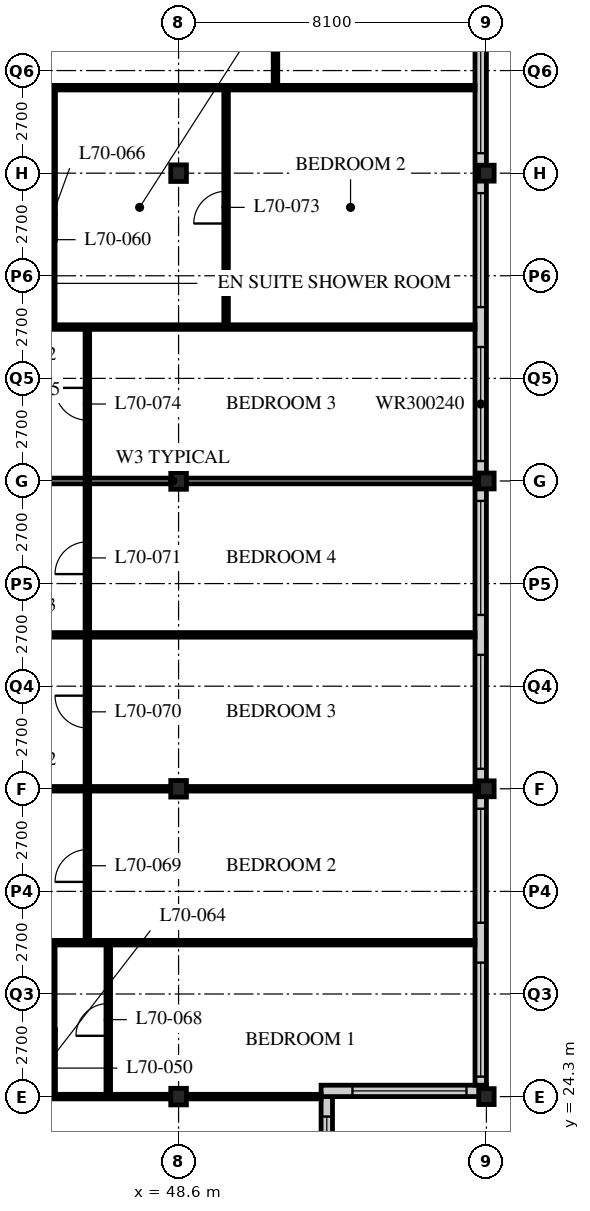
"""IFC4 building model, lengths in metres.
Left out: names, types, materials, properties, quantities, classifications, styles, units other than length and angle.
Written with IfcOpenShell. Run it as: python <this file> out.ifc"""

import sys

from ifc_helpers import new_model, si_unit, direction, frame, frame_2d, origin, origin_2d, place, context, subcontext, project, spatial, rectangle, i_section, extrude, element, fill, save


model = new_model("IFC4")
c1 = context("Model", 3, precision=1e-05, world=origin(), true_north=direction((0.0, 1.0)))
c2 = subcontext(c1, "Body", "Model", "MODEL_VIEW")
j1 = project(units=[si_unit("LENGTHUNIT", "METRE"), si_unit("PLANEANGLEUNIT", "RADIAN")], contexts=[c1])
p1 = place(None, origin())
s1 = spatial("IfcSite", under=j1, at=p1, CompositionType="ELEMENT")
p2 = place(p1, origin())
s2 = spatial("IfcBuilding", under=s1, at=p2, CompositionType="ELEMENT")
p3 = place(p2, frame((0.0, 0.0, 273.6)))
s3 = spatial("IfcBuildingStorey", under=s2, at=p3, CompositionType="ELEMENT", Elevation=273.6)
for number, where, z_axis, x_axis in (
    (1, (48.6, 24.3, 0.0), (0.0, 0.0, 1.0), (1.0, 0.0, 0.0)),
    (2, (48.6, 32.4, 0.0), (0.0, 0.0, 1.0), (1.0, 0.0, 0.0)),
    (3, (48.6, 40.5, 0.0), (0.0, 0.0, 1.0), (1.0, 0.0, 0.0)),
    (4, (48.6, 48.6, 0.0), (0.0, 0.0, 1.0), (1.0, 0.0, 0.0)),
):
    element("IfcColumn", number, at=place(p3, frame(where, z_axis=z_axis, x_axis=x_axis)), inside=s3, PredefinedType="COLUMN", context=c2, shape_type="SweptSolid", body=[
        extrude(i_section(OverallWidth=0.412, OverallDepth=0.437, WebThickness=0.036, FlangeThickness=0.058, FilletRadius=0.015, at=origin_2d()), origin(), (0.0, 0.0, 1.0), 3.9),
    ])
for number, where, z_axis, x_axis in (
    (5, (56.7, 24.3, 0.0), (0.0, 0.0, 1.0), (1.0, 0.0, 0.0)),
    (6, (56.7, 32.4, 0.0), (0.0, 0.0, 1.0), (1.0, 0.0, 0.0)),
    (7, (56.7, 40.5, 0.0), (0.0, 0.0, 1.0), (1.0, 0.0, 0.0)),
    (8, (56.7, 48.6, 0.0), (0.0, 0.0, 1.0), (1.0, 0.0, 0.0)),
):
    element("IfcColumn", number, at=place(p3, frame(where, z_axis=z_axis, x_axis=x_axis)), inside=s3, PredefinedType="COLUMN", context=c2, shape_type="SweptSolid", body=[
        extrude(i_section(OverallWidth=0.407, OverallDepth=0.419, WebThickness=0.031, FlangeThickness=0.049, FilletRadius=0.015, at=origin_2d()), origin(), (0.0, 0.0, 1.0), 3.9),
    ])
p4 = place(p3, frame((52.5, 20.55, 0.0), z_axis=(0.0, 0.0, 1.0), x_axis=(0.0, 1.0, 0.0)))
e9 = element("IfcWall", 9, at=p4, inside=s3, PredefinedType="SOLIDWALL", context=c2, shape_type="SweptSolid", body=[
    extrude(rectangle(XDim=3.75, YDim=0.3, at=frame_2d((1.875, 0.0))), origin(), (0.0, 0.0, 1.0), 3.69),
])
p5 = place(p4, frame((0.225, 0.0, 0.6)))
e10 = element("IfcOpeningElement", 10, at=p5, cuts=e9, PredefinedType="OPENING", context=c2, shape_type="SweptSolid", body=[
    extrude(rectangle(XDim=3.0, YDim=2.3, at=frame_2d((1.5, 1.15))), frame((0.0, 0.16, 0.0), z_axis=(0.0, -1.0, 0.0), x_axis=(1.0, 0.0, 0.0)), (0.0, 0.0, 1.0), 0.32),
])
p6 = place(p3, frame((52.35, 24.45, 0.0), z_axis=(0.0, 0.0, 1.0), x_axis=(1.0, 0.0, 0.0)))
e11 = element("IfcWall", 11, at=p6, inside=s3, PredefinedType="SOLIDWALL", context=c2, shape_type="SweptSolid", body=[
    extrude(rectangle(XDim=4.35, YDim=0.3, at=frame_2d((2.175, 0.0))), origin(), (0.0, 0.0, 1.0), 3.69),
])
p7 = place(p6, frame((0.825, 0.0, 0.6)))
e12 = element("IfcOpeningElement", 12, at=p7, cuts=e11, PredefinedType="OPENING", context=c2, shape_type="SweptSolid", body=[
    extrude(rectangle(XDim=3.0, YDim=2.3, at=frame_2d((1.5, 1.15))), frame((0.0, 0.16, 0.0), z_axis=(0.0, -1.0, 0.0), x_axis=(1.0, 0.0, 0.0)), (0.0, 0.0, 1.0), 0.32),
])
p8 = place(p3, frame((56.55, 24.6, 0.0), z_axis=(0.0, 0.0, 1.0), x_axis=(0.0, 1.0, 0.0)))
e13 = element("IfcWall", 13, at=p8, inside=s3, PredefinedType="SOLIDWALL", context=c2, shape_type="SweptSolid", body=[
    extrude(rectangle(XDim=32.1, YDim=0.3, at=frame_2d((16.05, 0.0))), origin(), (0.0, 0.0, 1.0), 3.69),
])
p9 = place(p8, frame((0.225, 0.0, 0.6)))
e14 = element("IfcOpeningElement", 14, at=p9, cuts=e13, PredefinedType="OPENING", context=c2, shape_type="SweptSolid", body=[
    extrude(rectangle(XDim=3.0, YDim=2.4, at=frame_2d((1.5, 1.2))), frame((0.0, 0.16, 0.0), z_axis=(0.0, -1.0, 0.0), x_axis=(1.0, 0.0, 0.0)), (0.0, 0.0, 1.0), 0.32),
])
p10 = place(p8, frame((4.275, 0.0, 0.6)))
e15 = element("IfcOpeningElement", 15, at=p10, cuts=e13, PredefinedType="OPENING", context=c2, shape_type="SweptSolid", body=[
    extrude(rectangle(XDim=3.0, YDim=2.4, at=frame_2d((1.5, 1.2))), frame((0.0, 0.16, 0.0), z_axis=(0.0, -1.0, 0.0), x_axis=(1.0, 0.0, 0.0)), (0.0, 0.0, 1.0), 0.32),
])
p11 = place(p8, frame((8.325, 0.0, 0.6)))
e16 = element("IfcOpeningElement", 16, at=p11, cuts=e13, PredefinedType="OPENING", context=c2, shape_type="SweptSolid", body=[
    extrude(rectangle(XDim=3.0, YDim=2.4, at=frame_2d((1.5, 1.2))), frame((0.0, 0.16, 0.0), z_axis=(0.0, -1.0, 0.0), x_axis=(1.0, 0.0, 0.0)), (0.0, 0.0, 1.0), 0.32),
])
p12 = place(p8, frame((12.375, 0.0, 0.6)))
e17 = element("IfcOpeningElement", 17, at=p12, cuts=e13, PredefinedType="OPENING", context=c2, shape_type="SweptSolid", body=[
    extrude(rectangle(XDim=3.0, YDim=2.4, at=frame_2d((1.5, 1.2))), frame((0.0, 0.16, 0.0), z_axis=(0.0, -1.0, 0.0), x_axis=(1.0, 0.0, 0.0)), (0.0, 0.0, 1.0), 0.32),
])
p13 = place(p8, frame((16.425, 0.0, 0.6)))
e18 = element("IfcOpeningElement", 18, at=p13, cuts=e13, PredefinedType="OPENING", context=c2, shape_type="SweptSolid", body=[
    extrude(rectangle(XDim=3.0, YDim=2.4, at=frame_2d((1.5, 1.2))), frame((0.0, 0.16, 0.0), z_axis=(0.0, -1.0, 0.0), x_axis=(1.0, 0.0, 0.0)), (0.0, 0.0, 1.0), 0.32),
])
p14 = place(p8, frame((20.475, 0.0, 0.6)))
e19 = element("IfcOpeningElement", 19, at=p14, cuts=e13, PredefinedType="OPENING", context=c2, shape_type="SweptSolid", body=[
    extrude(rectangle(XDim=3.0, YDim=2.4, at=frame_2d((1.5, 1.2))), frame((0.0, 0.16, 0.0), z_axis=(0.0, -1.0, 0.0), x_axis=(1.0, 0.0, 0.0)), (0.0, 0.0, 1.0), 0.32),
])
p15 = place(p8, frame((24.525, 0.0, 0.6)))
e20 = element("IfcOpeningElement", 20, at=p15, cuts=e13, PredefinedType="OPENING", context=c2, shape_type="SweptSolid", body=[
    extrude(rectangle(XDim=3.0, YDim=2.4, at=frame_2d((1.5, 1.2))), frame((0.0, 0.16, 0.0), z_axis=(0.0, -1.0, 0.0), x_axis=(1.0, 0.0, 0.0)), (0.0, 0.0, 1.0), 0.32),
])
p16 = place(p8, frame((28.575, 0.0, 0.6)))
e21 = element("IfcOpeningElement", 21, at=p16, cuts=e13, PredefinedType="OPENING", context=c2, shape_type="SweptSolid", body=[
    extrude(rectangle(XDim=3.0, YDim=2.4, at=frame_2d((1.5, 1.2))), frame((0.0, 0.16, 0.0), z_axis=(0.0, -1.0, 0.0), x_axis=(1.0, 0.0, 0.0)), (0.0, 0.0, 1.0), 0.32),
])
p17 = place(p3, frame((42.9, 24.3, 0.0), z_axis=(0.0, 0.0, 1.0), x_axis=(1.0, 0.0, 0.0)))
e22 = element("IfcWall", 22, at=p17, inside=s3, PredefinedType="PARTITIONING", context=c2, shape_type="SweptSolid", body=[
    extrude(rectangle(XDim=9.45, YDim=0.12, at=frame_2d((4.725, 0.0))), origin(), (0.0, 0.0, 1.0), 3.078),
])
p18 = place(p3, frame((40.5, 40.5, 0.0), z_axis=(0.0, 0.0, 1.0), x_axis=(1.0, 0.0, 0.0)))
e23 = element("IfcWall", 23, at=p18, inside=s3, PredefinedType="PARTITIONING", context=c2, shape_type="SweptSolid", body=[
    extrude(rectangle(XDim=15.9, YDim=0.15, at=frame_2d((7.95, 0.0))), origin(), (0.0, 0.0, 1.0), 3.078),
])
p19 = place(p3, frame((42.9, 26.05, 0.0), z_axis=(0.0, 0.0, 1.0), x_axis=(1.0, 0.0, 0.0)))
e24 = element("IfcWall", 24, at=p19, inside=s3, PredefinedType="PARTITIONING", context=c2, shape_type="SweptSolid", body=[
    extrude(rectangle(XDim=2.4, YDim=0.1, at=frame_2d((1.2, 0.0))), origin(), (0.0, 0.0, 1.0), 3.69),
])
p20 = place(p19, frame((0.8, 0.0, 0.0)))
e25 = element("IfcOpeningElement", 25, at=p20, cuts=e24, PredefinedType="OPENING", context=c2, shape_type="SweptSolid", body=[
    extrude(rectangle(XDim=0.8, YDim=2.1, at=frame_2d((0.4, 1.05))), frame((0.0, 0.06, 0.0), z_axis=(0.0, -1.0, 0.0), x_axis=(1.0, 0.0, 0.0)), (0.0, 0.0, 1.0), 0.12),
])
p21 = place(p3, frame((45.3, 26.05, 0.0), z_axis=(0.0, 0.0, 1.0), x_axis=(0.0, 1.0, 0.0)))
e26 = element("IfcWall", 26, at=p21, inside=s3, PredefinedType="PARTITIONING", context=c2, shape_type="SweptSolid", body=[
    extrude(rectangle(XDim=2.3, YDim=0.1, at=frame_2d((1.15, 0.0))), origin(), (0.0, 0.0, 1.0), 3.69),
])
p22 = place(p3, frame((42.9, 28.35, 0.0), z_axis=(0.0, 0.0, 1.0), x_axis=(1.0, 0.0, 0.0)))
e27 = element("IfcWall", 27, at=p22, inside=s3, PredefinedType="PARTITIONING", context=c2, shape_type="SweptSolid", body=[
    extrude(rectangle(XDim=13.5, YDim=0.12, at=frame_2d((6.75, 0.0))), origin(), (0.0, 0.0, 1.0), 3.69),
])
p23 = place(p3, frame((42.9, 32.4, 0.0), z_axis=(0.0, 0.0, 1.0), x_axis=(1.0, 0.0, 0.0)))
e28 = element("IfcWall", 28, at=p23, inside=s3, PredefinedType="PARTITIONING", context=c2, shape_type="SweptSolid", body=[
    extrude(rectangle(XDim=13.5, YDim=0.12, at=frame_2d((6.75, 0.0))), origin(), (0.0, 0.0, 1.0), 3.078),
])
for number, where, z_axis, x_axis in (
    (29, (42.9, 36.45, 0.0), (0.0, 0.0, 1.0), (1.0, 0.0, 0.0)),
    (30, (42.9, 50.85, 0.0), (0.0, 0.0, 1.0), (1.0, 0.0, 0.0)),
):
    element("IfcWall", number, at=place(p3, frame(where, z_axis=z_axis, x_axis=x_axis)), inside=s3, PredefinedType="PARTITIONING", context=c2, shape_type="SweptSolid", body=[
        extrude(rectangle(XDim=13.5, YDim=0.12, at=frame_2d((6.75, 0.0))), origin(), (0.0, 0.0, 1.0), 3.69),
    ])
p24 = place(p3, frame((42.9, 46.85, 0.0), z_axis=(0.0, 0.0, 1.0), x_axis=(1.0, 0.0, 0.0)))
e31 = element("IfcWall", 31, at=p24, inside=s3, PredefinedType="PARTITIONING", context=c2, shape_type="SweptSolid", body=[
    extrude(rectangle(XDim=2.4, YDim=0.1, at=frame_2d((1.2, 0.0))), origin(), (0.0, 0.0, 1.0), 3.69),
])
p25 = place(p24, frame((0.8, 0.0, 0.0)))
e32 = element("IfcOpeningElement", 32, at=p25, cuts=e31, PredefinedType="OPENING", context=c2, shape_type="SweptSolid", body=[
    extrude(rectangle(XDim=0.8, YDim=2.1, at=frame_2d((0.4, 1.05))), frame((0.0, 0.06, 0.0), z_axis=(0.0, -1.0, 0.0), x_axis=(1.0, 0.0, 0.0)), (0.0, 0.0, 1.0), 0.12),
])
p26 = place(p3, frame((45.3, 46.85, 0.0), z_axis=(0.0, 0.0, 1.0), x_axis=(0.0, -1.0, 0.0)))
e33 = element("IfcWall", 33, at=p26, inside=s3, PredefinedType="PARTITIONING", context=c2, shape_type="SweptSolid", body=[
    extrude(rectangle(XDim=2.3, YDim=0.1, at=frame_2d((1.15, 0.0))), origin(), (0.0, 0.0, 1.0), 3.69),
])
p27 = place(p3, frame((42.9, 44.55, 0.0), z_axis=(0.0, 0.0, 1.0), x_axis=(1.0, 0.0, 0.0)))
e34 = element("IfcWall", 34, at=p27, inside=s3, PredefinedType="PARTITIONING", context=c2, shape_type="SweptSolid", body=[
    extrude(rectangle(XDim=13.5, YDim=0.12, at=frame_2d((6.75, 0.0))), origin(), (0.0, 0.0, 1.0), 3.69),
])
p28 = place(p3, frame((45.3, 24.3, 0.0), z_axis=(0.0, 0.0, 1.0), x_axis=(0.0, 1.0, 0.0)))
e35 = element("IfcWall", 35, at=p28, inside=s3, PredefinedType="PARTITIONING", context=c2, shape_type="SweptSolid", body=[
    extrude(rectangle(XDim=1.76, YDim=0.12, at=frame_2d((0.88, 0.0))), origin(), (0.0, 0.0, 1.0), 3.69),
])
p29 = place(p28, frame((0.635, 0.0, 0.0)))
e36 = element("IfcOpeningElement", 36, at=p29, cuts=e35, PredefinedType="OPENING", context=c2, shape_type="SweptSolid", body=[
    extrude(rectangle(XDim=0.85, YDim=2.1, at=frame_2d((0.425, 1.05))), frame((0.0, 0.07, 0.0), z_axis=(0.0, -1.0, 0.0), x_axis=(1.0, 0.0, 0.0)), (0.0, 0.0, 1.0), 0.14),
])
p30 = place(p3, frame((45.3, 50.85, 0.0), z_axis=(0.0, 0.0, 1.0), x_axis=(0.0, -1.0, 0.0)))
e37 = element("IfcWall", 37, at=p30, inside=s3, PredefinedType="PARTITIONING", context=c2, shape_type="SweptSolid", body=[
    extrude(rectangle(XDim=4.01, YDim=0.12, at=frame_2d((2.005, 0.0))), origin(), (0.0, 0.0, 1.0), 3.69),
])
p31 = place(p30, frame((2.885, 0.0, 0.0)))
e38 = element("IfcOpeningElement", 38, at=p31, cuts=e37, PredefinedType="OPENING", context=c2, shape_type="SweptSolid", body=[
    extrude(rectangle(XDim=0.85, YDim=2.1, at=frame_2d((0.425, 1.05))), frame((0.0, 0.07, 0.0), z_axis=(0.0, -1.0, 0.0), x_axis=(1.0, 0.0, 0.0)), (0.0, 0.0, 1.0), 0.14),
])
p32 = place(p3, frame((46.75, 24.3, 0.0), z_axis=(0.0, 0.0, 1.0), x_axis=(0.0, 1.0, 0.0)))
e39 = element("IfcWall", 39, at=p32, inside=s3, PredefinedType="PARTITIONING", context=c2, shape_type="SweptSolid", body=[
    extrude(rectangle(XDim=4.05, YDim=0.12, at=frame_2d((2.025, 0.0))), origin(), (0.0, 0.0, 1.0), 3.69),
])
p33 = place(p32, frame((1.6, 0.0, 0.0)))
e40 = element("IfcOpeningElement", 40, at=p33, cuts=e39, PredefinedType="OPENING", context=c2, shape_type="SweptSolid", body=[
    extrude(rectangle(XDim=0.85, YDim=2.1, at=frame_2d((0.425, 1.05))), frame((0.0, 0.07, 0.0), z_axis=(0.0, -1.0, 0.0), x_axis=(1.0, 0.0, 0.0)), (0.0, 0.0, 1.0), 0.14),
])
p34 = place(p3, frame((46.2, 28.35, 0.0), z_axis=(0.0, 0.0, 1.0), x_axis=(0.0, 1.0, 0.0)))
e41 = element("IfcWall", 41, at=p34, inside=s3, PredefinedType="PARTITIONING", context=c2, shape_type="SweptSolid", body=[
    extrude(rectangle(XDim=16.2, YDim=0.12, at=frame_2d((8.1, 0.0))), origin(), (0.0, 0.0, 1.0), 3.69),
])
p35 = place(p34, frame((1.6, 0.0, 0.0)))
e42 = element("IfcOpeningElement", 42, at=p35, cuts=e41, PredefinedType="OPENING", context=c2, shape_type="SweptSolid", body=[
    extrude(rectangle(XDim=0.85, YDim=2.1, at=frame_2d((0.425, 1.05))), frame((0.0, 0.07, 0.0), z_axis=(0.0, -1.0, 0.0), x_axis=(1.0, 0.0, 0.0)), (0.0, 0.0, 1.0), 0.14),
])
p36 = place(p34, frame((5.65, 0.0, 0.0)))
e43 = element("IfcOpeningElement", 43, at=p36, cuts=e41, PredefinedType="OPENING", context=c2, shape_type="SweptSolid", body=[
    extrude(rectangle(XDim=0.85, YDim=2.1, at=frame_2d((0.425, 1.05))), frame((0.0, 0.07, 0.0), z_axis=(0.0, -1.0, 0.0), x_axis=(1.0, 0.0, 0.0)), (0.0, 0.0, 1.0), 0.14),
])
p37 = place(p34, frame((9.7, 0.0, 0.0)))
e44 = element("IfcOpeningElement", 44, at=p37, cuts=e41, PredefinedType="OPENING", context=c2, shape_type="SweptSolid", body=[
    extrude(rectangle(XDim=0.85, YDim=2.1, at=frame_2d((0.425, 1.05))), frame((0.0, 0.07, 0.0), z_axis=(0.0, -1.0, 0.0), x_axis=(1.0, 0.0, 0.0)), (0.0, 0.0, 1.0), 0.14),
])
p38 = place(p34, frame((13.75, 0.0, 0.0)))
e45 = element("IfcOpeningElement", 45, at=p38, cuts=e41, PredefinedType="OPENING", context=c2, shape_type="SweptSolid", body=[
    extrude(rectangle(XDim=0.85, YDim=2.1, at=frame_2d((0.425, 1.05))), frame((0.0, 0.07, 0.0), z_axis=(0.0, -1.0, 0.0), x_axis=(1.0, 0.0, 0.0)), (0.0, 0.0, 1.0), 0.14),
])
p39 = place(p3, frame((51.15, 50.85, 0.0), z_axis=(0.0, 0.0, 1.0), x_axis=(0.0, 1.0, 0.0)))
e46 = element("IfcWall", 46, at=p39, inside=s3, PredefinedType="PARTITIONING", context=c2, shape_type="SweptSolid", body=[
    extrude(rectangle(XDim=7.8, YDim=0.12, at=frame_2d((3.9, 0.0))), origin(), (0.0, 0.0, 1.0), 3.69),
])
p40 = place(p39, frame((3.475, 0.0, 0.0)))
e47 = element("IfcOpeningElement", 47, at=p40, cuts=e46, PredefinedType="OPENING", context=c2, shape_type="SweptSolid", body=[
    extrude(rectangle(XDim=0.85, YDim=2.1, at=frame_2d((0.425, 1.05))), frame((0.0, 0.07, 0.0), z_axis=(0.0, -1.0, 0.0), x_axis=(1.0, 0.0, 0.0)), (0.0, 0.0, 1.0), 0.14),
])
p41 = place(p3, frame((49.85, 44.55, 0.0), z_axis=(0.0, 0.0, 1.0), x_axis=(0.0, 1.0, 0.0)))
e48 = element("IfcWall", 48, at=p41, inside=s3, PredefinedType="PARTITIONING", context=c2, shape_type="SweptSolid", body=[
    extrude(rectangle(XDim=6.3, YDim=0.12, at=frame_2d((3.15, 0.0))), origin(), (0.0, 0.0, 1.0), 3.69),
])
p42 = place(p41, frame((2.725, 0.0, 0.0)))
e49 = element("IfcOpeningElement", 49, at=p42, cuts=e48, PredefinedType="OPENING", context=c2, shape_type="SweptSolid", body=[
    extrude(rectangle(XDim=0.85, YDim=2.1, at=frame_2d((0.425, 1.05))), frame((0.0, 0.07, 0.0), z_axis=(0.0, -1.0, 0.0), x_axis=(1.0, 0.0, 0.0)), (0.0, 0.0, 1.0), 0.14),
])
p43 = place(p5, origin())
e50 = element("IfcWindow", 50, at=p43, inside=s3, PartitioningType="SINGLE_PANEL", PredefinedType="WINDOW", context=c2, shape_type="SweptSolid", body=[
    extrude(rectangle(XDim=3.0, YDim=2.3, at=frame_2d((1.5, 1.15))), frame((0.0, 0.03, 0.0), z_axis=(0.0, -1.0, 0.0), x_axis=(1.0, 0.0, 0.0)), (0.0, 0.0, 1.0), 0.06),
])
fill(e10, e50)
p44 = place(p7, origin())
e51 = element("IfcWindow", 51, at=p44, inside=s3, PartitioningType="SINGLE_PANEL", PredefinedType="WINDOW", context=c2, shape_type="SweptSolid", body=[
    extrude(rectangle(XDim=3.0, YDim=2.3, at=frame_2d((1.5, 1.15))), frame((0.0, 0.03, 0.0), z_axis=(0.0, -1.0, 0.0), x_axis=(1.0, 0.0, 0.0)), (0.0, 0.0, 1.0), 0.06),
])
fill(e12, e51)
p45 = place(p9, origin())
e52 = element("IfcWindow", 52, at=p45, inside=s3, PartitioningType="SINGLE_PANEL", PredefinedType="WINDOW", context=c2, shape_type="SweptSolid", body=[
    extrude(rectangle(XDim=3.0, YDim=2.4, at=frame_2d((1.5, 1.2))), frame((0.0, 0.03, 0.0), z_axis=(0.0, -1.0, 0.0), x_axis=(1.0, 0.0, 0.0)), (0.0, 0.0, 1.0), 0.06),
])
fill(e14, e52)
p46 = place(p10, origin())
e53 = element("IfcWindow", 53, at=p46, inside=s3, PartitioningType="SINGLE_PANEL", PredefinedType="WINDOW", context=c2, shape_type="SweptSolid", body=[
    extrude(rectangle(XDim=3.0, YDim=2.4, at=frame_2d((1.5, 1.2))), frame((0.0, 0.03, 0.0), z_axis=(0.0, -1.0, 0.0), x_axis=(1.0, 0.0, 0.0)), (0.0, 0.0, 1.0), 0.06),
])
fill(e15, e53)
p47 = place(p11, origin())
e54 = element("IfcWindow", 54, at=p47, inside=s3, PartitioningType="SINGLE_PANEL", PredefinedType="WINDOW", context=c2, shape_type="SweptSolid", body=[
    extrude(rectangle(XDim=3.0, YDim=2.4, at=frame_2d((1.5, 1.2))), frame((0.0, 0.03, 0.0), z_axis=(0.0, -1.0, 0.0), x_axis=(1.0, 0.0, 0.0)), (0.0, 0.0, 1.0), 0.06),
])
fill(e16, e54)
p48 = place(p12, origin())
e55 = element("IfcWindow", 55, at=p48, inside=s3, PartitioningType="SINGLE_PANEL", PredefinedType="WINDOW", context=c2, shape_type="SweptSolid", body=[
    extrude(rectangle(XDim=3.0, YDim=2.4, at=frame_2d((1.5, 1.2))), frame((0.0, 0.03, 0.0), z_axis=(0.0, -1.0, 0.0), x_axis=(1.0, 0.0, 0.0)), (0.0, 0.0, 1.0), 0.06),
])
fill(e17, e55)
p49 = place(p13, origin())
e56 = element("IfcWindow", 56, at=p49, inside=s3, PartitioningType="SINGLE_PANEL", PredefinedType="WINDOW", context=c2, shape_type="SweptSolid", body=[
    extrude(rectangle(XDim=3.0, YDim=2.4, at=frame_2d((1.5, 1.2))), frame((0.0, 0.03, 0.0), z_axis=(0.0, -1.0, 0.0), x_axis=(1.0, 0.0, 0.0)), (0.0, 0.0, 1.0), 0.06),
])
fill(e18, e56)
p50 = place(p14, origin())
e57 = element("IfcWindow", 57, at=p50, inside=s3, PartitioningType="SINGLE_PANEL", PredefinedType="WINDOW", context=c2, shape_type="SweptSolid", body=[
    extrude(rectangle(XDim=3.0, YDim=2.4, at=frame_2d((1.5, 1.2))), frame((0.0, 0.03, 0.0), z_axis=(0.0, -1.0, 0.0), x_axis=(1.0, 0.0, 0.0)), (0.0, 0.0, 1.0), 0.06),
])
fill(e19, e57)
p51 = place(p15, origin())
e58 = element("IfcWindow", 58, at=p51, inside=s3, PartitioningType="SINGLE_PANEL", PredefinedType="WINDOW", context=c2, shape_type="SweptSolid", body=[
    extrude(rectangle(XDim=3.0, YDim=2.4, at=frame_2d((1.5, 1.2))), frame((0.0, 0.03, 0.0), z_axis=(0.0, -1.0, 0.0), x_axis=(1.0, 0.0, 0.0)), (0.0, 0.0, 1.0), 0.06),
])
fill(e20, e58)
p52 = place(p29, origin())
e59 = element("IfcDoor", 59, at=p52, inside=s3, OperationType="SINGLE_SWING_RIGHT", PredefinedType="DOOR", context=c2, shape_type="SweptSolid", body=[
    extrude(rectangle(XDim=0.85, YDim=2.1, at=frame_2d((0.425, 1.05))), frame((0.0, 0.025, 0.0), z_axis=(0.0, -1.0, 0.0), x_axis=(1.0, 0.0, 0.0)), (0.0, 0.0, 1.0), 0.05),
])
fill(e36, e59)
p53 = place(p31, origin())
e60 = element("IfcDoor", 60, at=p53, inside=s3, OperationType="SINGLE_SWING_LEFT", PredefinedType="DOOR", context=c2, shape_type="SweptSolid", body=[
    extrude(rectangle(XDim=0.85, YDim=2.1, at=frame_2d((0.425, 1.05))), frame((0.0, 0.025, 0.0), z_axis=(0.0, -1.0, 0.0), x_axis=(1.0, 0.0, 0.0)), (0.0, 0.0, 1.0), 0.05),
])
fill(e38, e60)
p54 = place(p33, origin())
e61 = element("IfcDoor", 61, at=p54, inside=s3, OperationType="SINGLE_SWING_LEFT", PredefinedType="DOOR", context=c2, shape_type="SweptSolid", body=[
    extrude(rectangle(XDim=0.85, YDim=2.1, at=frame_2d((0.425, 1.05))), frame((0.0, 0.025, 0.0), z_axis=(0.0, -1.0, 0.0), x_axis=(1.0, 0.0, 0.0)), (0.0, 0.0, 1.0), 0.05),
])
fill(e40, e61)
p55 = place(p35, origin())
e62 = element("IfcDoor", 62, at=p55, inside=s3, OperationType="SINGLE_SWING_LEFT", PredefinedType="DOOR", context=c2, shape_type="SweptSolid", body=[
    extrude(rectangle(XDim=0.85, YDim=2.1, at=frame_2d((0.425, 1.05))), frame((0.0, 0.025, 0.0), z_axis=(0.0, -1.0, 0.0), x_axis=(1.0, 0.0, 0.0)), (0.0, 0.0, 1.0), 0.05),
])
fill(e42, e62)
p56 = place(p36, origin())
e63 = element("IfcDoor", 63, at=p56, inside=s3, OperationType="SINGLE_SWING_RIGHT", PredefinedType="DOOR", context=c2, shape_type="SweptSolid", body=[
    extrude(rectangle(XDim=0.85, YDim=2.1, at=frame_2d((0.425, 1.05))), frame((0.0, 0.025, 0.0), z_axis=(0.0, -1.0, 0.0), x_axis=(1.0, 0.0, 0.0)), (0.0, 0.0, 1.0), 0.05),
])
fill(e43, e63)
p57 = place(p37, origin())
e64 = element("IfcDoor", 64, at=p57, inside=s3, OperationType="SINGLE_SWING_LEFT", PredefinedType="DOOR", context=c2, shape_type="SweptSolid", body=[
    extrude(rectangle(XDim=0.85, YDim=2.1, at=frame_2d((0.425, 1.05))), frame((0.0, 0.025, 0.0), z_axis=(0.0, -1.0, 0.0), x_axis=(1.0, 0.0, 0.0)), (0.0, 0.0, 1.0), 0.05),
])
fill(e44, e64)
p58 = place(p42, origin())
e65 = element("IfcDoor", 65, at=p58, inside=s3, OperationType="SINGLE_SWING_LEFT", PredefinedType="DOOR", context=c2, shape_type="SweptSolid", body=[
    extrude(rectangle(XDim=0.85, YDim=2.1, at=frame_2d((0.425, 1.05))), frame((0.0, 0.025, 0.0), z_axis=(0.0, -1.0, 0.0), x_axis=(1.0, 0.0, 0.0)), (0.0, 0.0, 1.0), 0.05),
])
fill(e49, e65)
p59 = place(p38, origin())
e66 = element("IfcDoor", 66, at=p59, inside=s3, OperationType="SINGLE_SWING_RIGHT", PredefinedType="DOOR", context=c2, shape_type="SweptSolid", body=[
    extrude(rectangle(XDim=0.85, YDim=2.1, at=frame_2d((0.425, 1.05))), frame((0.0, 0.025, 0.0), z_axis=(0.0, -1.0, 0.0), x_axis=(1.0, 0.0, 0.0)), (0.0, 0.0, 1.0), 0.05),
])
fill(e45, e66)
save(model, sys.argv[1])
